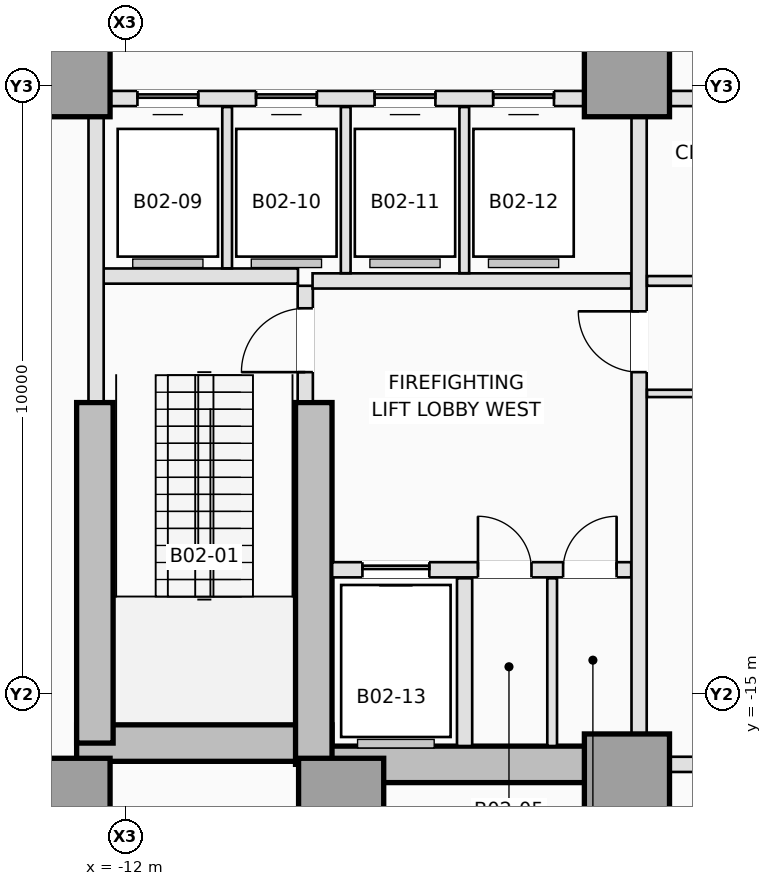
"""IFC4 building model, lengths in metres.
Left out: names, types, materials, properties, quantities, classifications, styles, units other than length and angle.
Written with IfcOpenShell. Run it as: python <this file> out.ifc"""

import sys

from ifc_helpers import new_model, si_unit, direction, frame, frame_2d, origin, origin_2d, place, context, subcontext, project, spatial, rectangle, extrude, element, fill, save


model = new_model("IFC4")
c1 = context("Model", 3, precision=1e-05, world=origin(), true_north=direction((0.0, 1.0)))
c2 = subcontext(c1, "Body", "Model", "MODEL_VIEW")
j1 = project(units=[si_unit("LENGTHUNIT", "METRE"), si_unit("PLANEANGLEUNIT", "RADIAN")], contexts=[c1])
p1 = place(None, origin())
s1 = spatial("IfcSite", under=j1, at=p1, CompositionType="ELEMENT")
p2 = place(p1, origin())
s2 = spatial("IfcBuilding", under=s1, at=p2, CompositionType="ELEMENT")
p3 = place(p2, frame((0.0, 0.0, -10.0)))
s3 = spatial("IfcBuildingStorey", under=s2, at=p3, CompositionType="ELEMENT", Elevation=-10.0)
p4 = place(p3, frame((-12.8, -15.8, 0.0), z_axis=(0.0, 0.0, 1.0), x_axis=(1.0, 0.0, 0.0)))
e1 = element("IfcWall", 1, at=p4, inside=s3, PredefinedType="SHEAR", context=c2, shape_type="SweptSolid", body=[
    extrude(rectangle(XDim=4.2, YDim=0.6, at=frame_2d((2.1, 0.0))), origin(), (0.0, 0.0, 1.0), 5.0),
])
p5 = place(p3, frame((-8.9, -16.15, 0.0), z_axis=(0.0, 0.0, 1.0), x_axis=(1.0, 0.0, 0.0)))
e2 = element("IfcWall", 2, at=p5, inside=s3, PredefinedType="SHEAR", context=c2, shape_type="SweptSolid", body=[
    extrude(rectangle(XDim=5.15, YDim=0.6, at=frame_2d((2.575, 0.0))), origin(), (0.0, 0.0, 1.0), 5.0),
])
p6 = place(p3, frame((-12.5, -15.8, 0.0), z_axis=(0.0, 0.0, 1.0), x_axis=(0.0, 1.0, 0.0)))
e3 = element("IfcWall", 3, at=p6, inside=s3, PredefinedType="SHEAR", context=c2, shape_type="SweptSolid", body=[
    extrude(rectangle(XDim=5.6, YDim=0.6, at=frame_2d((2.8, 0.0))), origin(), (0.0, 0.0, 1.0), 5.0),
])
p7 = place(p3, frame((-8.9, -16.15, 0.0), z_axis=(0.0, 0.0, 1.0), x_axis=(0.0, 1.0, 0.0)))
e4 = element("IfcWall", 4, at=p7, inside=s3, PredefinedType="SHEAR", context=c2, shape_type="SweptSolid", body=[
    extrude(rectangle(XDim=5.95, YDim=0.6, at=frame_2d((2.975, 0.0))), origin(), (0.0, 0.0, 1.0), 5.0),
])
for number, where, z_axis, x_axis in (
    (5, (-12.95, -16.75, -0.45), (0.0, 0.0, 1.0), (1.0, 0.0, 0.0)),
    (6, (-8.45, -16.75, -0.45), (0.0, 0.0, 1.0), (1.0, 0.0, 0.0)),
    (7, (-3.75, -16.35, -0.45), (0.0, 0.0, 1.0), (1.0, 0.0, 0.0)),
    (8, (-12.95, -4.8, -0.45), (0.0, 0.0, 1.0), (1.0, 0.0, 0.0)),
    (9, (-3.75, -4.8, -0.45), (0.0, 0.0, 1.0), (1.0, 0.0, 0.0)),
):
    element("IfcColumn", number, at=place(p3, frame(where, z_axis=z_axis, x_axis=x_axis)), inside=s3, PredefinedType="COLUMN", context=c2, shape_type="SweptSolid", body=[
        extrude(rectangle(XDim=1.4, YDim=1.4, at=origin_2d()), origin(), (0.0, 0.0, 1.0), 5.45),
    ])
p8 = place(p3, frame((-9.04, -10.18, 0.0), z_axis=(0.0, 0.0, 1.0), x_axis=(0.0, 1.0, 0.0)))
e10 = element("IfcWall", 10, at=p8, inside=s3, PredefinedType="PARTITIONING", context=c2, shape_type="SweptSolid", body=[
    extrude(rectangle(XDim=1.9, YDim=0.25, at=frame_2d((0.95, 0.0))), origin(), (0.0, 0.0, 1.0), 4.68),
])
p9 = place(p8, frame((0.48, 0.0, 0.0)))
e11 = element("IfcOpeningElement", 11, at=p9, cuts=e10, PredefinedType="OPENING", context=c2, shape_type="SweptSolid", body=[
    extrude(rectangle(XDim=1.05, YDim=2.15, at=frame_2d((0.525, 1.075))), frame((0.0, 0.135, 0.0), z_axis=(0.0, -1.0, 0.0), x_axis=(1.0, 0.0, 0.0)), (0.0, 0.0, 1.0), 0.27),
])
p10 = place(p3, frame((-12.38, -8.12, 0.0), z_axis=(0.0, 0.0, 1.0), x_axis=(1.0, 0.0, 0.0)))
e12 = element("IfcWall", 12, at=p10, inside=s3, PredefinedType="PARTITIONING", context=c2, shape_type="SweptSolid", body=[
    extrude(rectangle(XDim=3.22, YDim=0.25, at=frame_2d((1.61, 0.0))), origin(), (0.0, 0.0, 1.0), 4.68),
])
p11 = place(p3, frame((-12.48, -10.18, 0.0), z_axis=(0.0, 0.0, 1.0), x_axis=(0.0, 1.0, 0.0)))
e13 = element("IfcWall", 13, at=p11, inside=s3, PredefinedType="PARTITIONING", context=c2, shape_type="SweptSolid", body=[
    extrude(rectangle(XDim=4.678, YDim=0.25, at=frame_2d((2.339, 0.0))), origin(), (0.0, 0.0, 1.0), 4.68),
])
p12 = place(p3, frame((-8.598, -12.95, 0.0), z_axis=(0.0, 0.0, 1.0), x_axis=(1.0, 0.0, 0.0)))
e14 = element("IfcWall", 14, at=p12, inside=s3, PredefinedType="PARTITIONING", context=c2, shape_type="SweptSolid", body=[
    extrude(rectangle(XDim=4.918, YDim=0.25, at=frame_2d((2.459, 0.0))), origin(), (0.0, 0.0, 1.0), 4.68),
])
p13 = place(p12, frame((0.498, 0.0, 0.0)))
e15 = element("IfcOpeningElement", 15, at=p13, cuts=e14, PredefinedType="OPENING", context=c2, shape_type="SweptSolid", body=[
    extrude(rectangle(XDim=1.1, YDim=2.15, at=frame_2d((0.55, 1.075))), frame((0.0, 0.135, 0.0), z_axis=(0.0, -1.0, 0.0), x_axis=(1.0, 0.0, 0.0)), (0.0, 0.0, 1.0), 0.27),
])
p14 = place(p12, frame((2.398, 0.0, 0.0)))
e16 = element("IfcOpeningElement", 16, at=p14, cuts=e14, PredefinedType="OPENING", context=c2, shape_type="SweptSolid", body=[
    extrude(rectangle(XDim=0.88, YDim=2.1, at=frame_2d((0.44, 1.05))), frame((0.0, 0.135, 0.0), z_axis=(0.0, -1.0, 0.0), x_axis=(1.0, 0.0, 0.0)), (0.0, 0.0, 1.0), 0.27),
])
p15 = place(p12, frame((3.798, 0.0, 0.0)))
e17 = element("IfcOpeningElement", 17, at=p15, cuts=e14, PredefinedType="OPENING", context=c2, shape_type="SweptSolid", body=[
    extrude(rectangle(XDim=0.88, YDim=2.1, at=frame_2d((0.44, 1.05))), frame((0.0, 0.135, 0.0), z_axis=(0.0, -1.0, 0.0), x_axis=(1.0, 0.0, 0.0)), (0.0, 0.0, 1.0), 0.27),
])
p16 = place(p3, frame((-6.42, -15.848, 0.0), z_axis=(0.0, 0.0, 1.0), x_axis=(0.0, 1.0, 0.0)))
e18 = element("IfcWall", 18, at=p16, inside=s3, PredefinedType="PARTITIONING", context=c2, shape_type="SweptSolid", body=[
    extrude(rectangle(XDim=2.758, YDim=0.25, at=frame_2d((1.379, 0.0))), origin(), (0.0, 0.0, 1.0), 4.68),
])
p17 = place(p3, frame((-4.98, -15.848, 0.0), z_axis=(0.0, 0.0, 1.0), x_axis=(0.0, 1.0, 0.0)))
e19 = element("IfcWall", 19, at=p17, inside=s3, PredefinedType="PARTITIONING", context=c2, shape_type="SweptSolid", body=[
    extrude(rectangle(XDim=2.758, YDim=0.16, at=frame_2d((1.379, 0.0))), origin(), (0.0, 0.0, 1.0), 4.68),
])
p18 = place(p3, frame((-8.92, -8.2, 0.0), z_axis=(0.0, 0.0, 1.0), x_axis=(1.0, 0.0, 0.0)))
e20 = element("IfcWall", 20, at=p18, inside=s3, PredefinedType="PARTITIONING", context=c2, shape_type="SweptSolid", body=[
    extrude(rectangle(XDim=5.24, YDim=0.25, at=frame_2d((2.62, 0.0))), origin(), (0.0, 0.0, 1.0), 4.68),
])
p19 = place(p3, frame((-3.55, -15.648, 0.0), z_axis=(0.0, 0.0, 1.0), x_axis=(0.0, 1.0, 0.0)))
e21 = element("IfcWall", 21, at=p19, inside=s3, PredefinedType="PARTITIONING", context=c2, shape_type="SweptSolid", body=[
    extrude(rectangle(XDim=10.146, YDim=0.25, at=frame_2d((5.073, 0.0))), origin(), (0.0, 0.0, 1.0), 4.68),
])
p20 = place(p19, frame((5.948, 0.0, 0.0)))
e22 = element("IfcOpeningElement", 22, at=p20, cuts=e21, PredefinedType="OPENING", context=c2, shape_type="SweptSolid", body=[
    extrude(rectangle(XDim=1.0, YDim=2.15, at=frame_2d((0.5, 1.075))), frame((0.0, 0.135, 0.0), z_axis=(0.0, -1.0, 0.0), x_axis=(1.0, 0.0, 0.0)), (0.0, 0.0, 1.0), 0.27),
])
p21 = place(p3, frame((-12.248, -5.2, 0.0), z_axis=(0.0, 0.0, 1.0), x_axis=(1.0, 0.0, 0.0)))
e23 = element("IfcWall", 23, at=p21, inside=s3, PredefinedType="PARTITIONING", context=c2, shape_type="SweptSolid", body=[
    extrude(rectangle(XDim=7.796, YDim=0.25, at=frame_2d((3.898, 0.0))), origin(), (0.0, 0.0, 1.0), 4.68),
])
p22 = place(p21, frame((0.448, 0.0, 0.0)))
e24 = element("IfcOpeningElement", 24, at=p22, cuts=e23, PredefinedType="OPENING", context=c2, shape_type="SweptSolid", body=[
    extrude(rectangle(XDim=1.0, YDim=2.15, at=frame_2d((0.5, 1.075))), frame((0.0, 0.135, 0.0), z_axis=(0.0, -1.0, 0.0), x_axis=(1.0, 0.0, 0.0)), (0.0, 0.0, 1.0), 0.27),
])
p23 = place(p21, frame((2.398, 0.0, 0.0)))
e25 = element("IfcOpeningElement", 25, at=p23, cuts=e23, PredefinedType="OPENING", context=c2, shape_type="SweptSolid", body=[
    extrude(rectangle(XDim=1.0, YDim=2.15, at=frame_2d((0.5, 1.075))), frame((0.0, 0.135, 0.0), z_axis=(0.0, -1.0, 0.0), x_axis=(1.0, 0.0, 0.0)), (0.0, 0.0, 1.0), 0.27),
])
p24 = place(p21, frame((4.348, 0.0, 0.0)))
e26 = element("IfcOpeningElement", 26, at=p24, cuts=e23, PredefinedType="OPENING", context=c2, shape_type="SweptSolid", body=[
    extrude(rectangle(XDim=1.0, YDim=2.15, at=frame_2d((0.5, 1.075))), frame((0.0, 0.135, 0.0), z_axis=(0.0, -1.0, 0.0), x_axis=(1.0, 0.0, 0.0)), (0.0, 0.0, 1.0), 0.27),
])
p25 = place(p21, frame((6.298, 0.0, 0.0)))
e27 = element("IfcOpeningElement", 27, at=p25, cuts=e23, PredefinedType="OPENING", context=c2, shape_type="SweptSolid", body=[
    extrude(rectangle(XDim=1.0, YDim=2.15, at=frame_2d((0.5, 1.075))), frame((0.0, 0.135, 0.0), z_axis=(0.0, -1.0, 0.0), x_axis=(1.0, 0.0, 0.0)), (0.0, 0.0, 1.0), 0.27),
])
p26 = place(p3, frame((-3.048, -5.2, 0.0), z_axis=(0.0, 0.0, 1.0), x_axis=(1.0, 0.0, 0.0)))
e28 = element("IfcWall", 28, at=p26, inside=s3, PredefinedType="PARTITIONING", context=c2, shape_type="SweptSolid", body=[
    extrude(rectangle(XDim=2.098, YDim=0.25, at=frame_2d((1.049, 0.0))), origin(), (0.0, 0.0, 1.0), 4.68),
])
p27 = place(p3, frame((-10.325, -7.993, 0.0), z_axis=(0.0, 0.0, 1.0), x_axis=(0.0, 1.0, 0.0)))
e29 = element("IfcWall", 29, at=p27, inside=s3, PredefinedType="PARTITIONING", context=c2, shape_type="SweptSolid", body=[
    extrude(rectangle(XDim=2.653, YDim=0.16, at=frame_2d((1.326, 0.0))), origin(), (0.0, 0.0, 1.0), 4.68),
])
for number, where, z_axis, x_axis in (
    (30, (-8.375, -8.073, 0.0), (0.0, 0.0, 1.0), (0.0, 1.0, 0.0)),
    (31, (-6.425, -8.073, 0.0), (0.0, 0.0, 1.0), (0.0, 1.0, 0.0)),
):
    element("IfcWall", number, at=place(p3, frame(where, z_axis=z_axis, x_axis=x_axis)), inside=s3, PredefinedType="PARTITIONING", context=c2, shape_type="SweptSolid", body=[
        extrude(rectangle(XDim=2.733, YDim=0.16, at=frame_2d((1.366, 0.0))), origin(), (0.0, 0.0, 1.0), 4.68),
    ])
p28 = place(p3, frame((-3.048, -16.15, 0.0), z_axis=(0.0, 0.0, 1.0), x_axis=(1.0, 0.0, 0.0)))
e32 = element("IfcWall", 32, at=p28, inside=s3, PredefinedType="PARTITIONING", context=c2, shape_type="SweptSolid", body=[
    extrude(rectangle(XDim=6.096, YDim=0.25, at=frame_2d((3.048, 0.0))), origin(), (0.0, 0.0, 1.0), 3.656),
])
p29 = place(p3, frame((-3.42, -8.2, 0.0), z_axis=(0.0, 0.0, 1.0), x_axis=(1.0, 0.0, 0.0)))
e33 = element("IfcWall", 33, at=p29, inside=s3, PredefinedType="PARTITIONING", context=c2, shape_type="SweptSolid", body=[
    extrude(rectangle(XDim=6.84, YDim=0.16, at=frame_2d((3.42, 0.0))), origin(), (0.0, 0.0, 1.0), 4.68),
])
p30 = place(p29, frame((2.92, 0.0, 0.0)))
e34 = element("IfcOpeningElement", 34, at=p30, cuts=e33, PredefinedType="OPENING", context=c2, shape_type="SweptSolid", body=[
    extrude(rectangle(XDim=1.0, YDim=2.15, at=frame_2d((0.5, 1.075))), frame((0.0, 0.09, 0.0), z_axis=(0.0, -1.0, 0.0), x_axis=(1.0, 0.0, 0.0)), (0.0, 0.0, 1.0), 0.18),
])
p31 = place(p3, frame((-3.42, -10.05, 0.0), z_axis=(0.0, 0.0, 1.0), x_axis=(1.0, 0.0, 0.0)))
e35 = element("IfcWall", 35, at=p31, inside=s3, PredefinedType="PARTITIONING", context=c2, shape_type="SweptSolid", body=[
    extrude(rectangle(XDim=6.84, YDim=0.12, at=frame_2d((3.42, 0.0))), origin(), (0.0, 0.0, 1.0), 4.68),
])
p32 = place(p31, frame((2.95, 0.0, 0.0)))
e36 = element("IfcOpeningElement", 36, at=p32, cuts=e35, PredefinedType="OPENING", context=c2, shape_type="SweptSolid", body=[
    extrude(rectangle(XDim=0.92, YDim=2.12, at=frame_2d((0.46, 1.06))), frame((0.0, 0.07, 0.0), z_axis=(0.0, -1.0, 0.0), x_axis=(1.0, 0.0, 0.0)), (0.0, 0.0, 1.0), 0.14),
])
p33 = place(p22, origin())
e37 = element("IfcDoor", 37, at=p33, inside=s3, OperationType="SLIDING_TO_LEFT", PredefinedType="DOOR", context=c2, shape_type="SweptSolid", body=[
    extrude(rectangle(XDim=1.0, YDim=2.15, at=frame_2d((0.5, 1.075))), frame((0.0, 0.025, 0.0), z_axis=(0.0, -1.0, 0.0), x_axis=(1.0, 0.0, 0.0)), (0.0, 0.0, 1.0), 0.05),
])
fill(e24, e37)
p34 = place(p23, origin())
e38 = element("IfcDoor", 38, at=p34, inside=s3, OperationType="SLIDING_TO_LEFT", PredefinedType="DOOR", context=c2, shape_type="SweptSolid", body=[
    extrude(rectangle(XDim=1.0, YDim=2.15, at=frame_2d((0.5, 1.075))), frame((0.0, 0.025, 0.0), z_axis=(0.0, -1.0, 0.0), x_axis=(1.0, 0.0, 0.0)), (0.0, 0.0, 1.0), 0.05),
])
fill(e25, e38)
p35 = place(p24, origin())
e39 = element("IfcDoor", 39, at=p35, inside=s3, OperationType="SLIDING_TO_LEFT", PredefinedType="DOOR", context=c2, shape_type="SweptSolid", body=[
    extrude(rectangle(XDim=1.0, YDim=2.15, at=frame_2d((0.5, 1.075))), frame((0.0, 0.025, 0.0), z_axis=(0.0, -1.0, 0.0), x_axis=(1.0, 0.0, 0.0)), (0.0, 0.0, 1.0), 0.05),
])
fill(e26, e39)
p36 = place(p25, origin())
e40 = element("IfcDoor", 40, at=p36, inside=s3, OperationType="SLIDING_TO_LEFT", PredefinedType="DOOR", context=c2, shape_type="SweptSolid", body=[
    extrude(rectangle(XDim=1.0, YDim=2.15, at=frame_2d((0.5, 1.075))), frame((0.0, 0.025, 0.0), z_axis=(0.0, -1.0, 0.0), x_axis=(1.0, 0.0, 0.0)), (0.0, 0.0, 1.0), 0.05),
])
fill(e27, e40)
p37 = place(p13, origin())
e41 = element("IfcDoor", 41, at=p37, inside=s3, OperationType="SLIDING_TO_LEFT", PredefinedType="DOOR", context=c2, shape_type="SweptSolid", body=[
    extrude(rectangle(XDim=1.1, YDim=2.15, at=frame_2d((0.55, 1.075))), frame((0.0, 0.025, 0.0), z_axis=(0.0, -1.0, 0.0), x_axis=(1.0, 0.0, 0.0)), (0.0, 0.0, 1.0), 0.05),
])
fill(e15, e41)
p38 = place(p9, origin())
e42 = element("IfcDoor", 42, at=p38, inside=s3, OperationType="SINGLE_SWING_LEFT", PredefinedType="DOOR", context=c2, shape_type="SweptSolid", body=[
    extrude(rectangle(XDim=1.05, YDim=2.15, at=frame_2d((0.525, 1.075))), frame((0.0, 0.025, 0.0), z_axis=(0.0, -1.0, 0.0), x_axis=(1.0, 0.0, 0.0)), (0.0, 0.0, 1.0), 0.05),
])
fill(e11, e42)
p39 = place(p14, origin())
e43 = element("IfcDoor", 43, at=p39, inside=s3, OperationType="SINGLE_SWING_LEFT", PredefinedType="TRAPDOOR", context=c2, shape_type="SweptSolid", body=[
    extrude(rectangle(XDim=0.88, YDim=2.1, at=frame_2d((0.44, 1.05))), frame((0.0, 0.025, 0.0), z_axis=(0.0, -1.0, 0.0), x_axis=(1.0, 0.0, 0.0)), (0.0, 0.0, 1.0), 0.05),
])
fill(e16, e43)
p40 = place(p15, origin())
e44 = element("IfcDoor", 44, at=p40, inside=s3, OperationType="SINGLE_SWING_RIGHT", PredefinedType="TRAPDOOR", context=c2, shape_type="SweptSolid", body=[
    extrude(rectangle(XDim=0.88, YDim=2.1, at=frame_2d((0.44, 1.05))), frame((0.0, 0.025, 0.0), z_axis=(0.0, -1.0, 0.0), x_axis=(1.0, 0.0, 0.0)), (0.0, 0.0, 1.0), 0.05),
])
fill(e17, e44)
p41 = place(p20, origin())
e45 = element("IfcDoor", 45, at=p41, inside=s3, OperationType="SINGLE_SWING_RIGHT", PredefinedType="DOOR", context=c2, shape_type="SweptSolid", body=[
    extrude(rectangle(XDim=1.0, YDim=2.15, at=frame_2d((0.5, 1.075))), frame((0.0, 0.025, 0.0), z_axis=(0.0, -1.0, 0.0), x_axis=(1.0, 0.0, 0.0)), (0.0, 0.0, 1.0), 0.05),
])
fill(e22, e45)
save(model, sys.argv[1])
